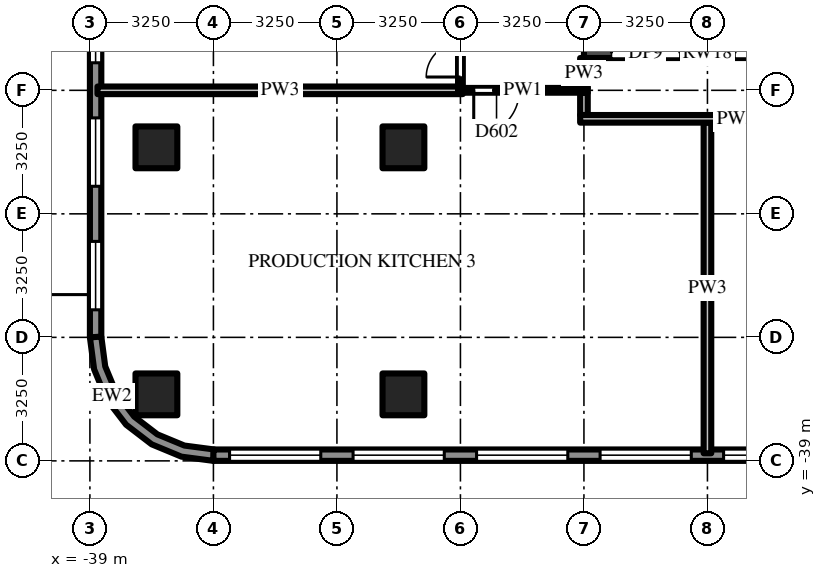
"""IFC4 building model, lengths in metres.
Left out: names, types, materials, properties, quantities, classifications, styles, units other than length and angle.
Written with IfcOpenShell. Run it as: python <this file> out.ifc"""

import sys

from ifc_helpers import new_model, si_unit, direction, frame, frame_2d, origin, origin_2d, place, context, subcontext, project, spatial, polyline, rectangle, outline, extrude, source, transform, mapped, element, fill, save


model = new_model("IFC4")
c1 = context("Model", 3, precision=1e-05, world=origin(), true_north=direction((0.0, 1.0)))
c2 = subcontext(c1, "Body", "Model", "MODEL_VIEW")
j1 = project(units=[si_unit("LENGTHUNIT", "METRE"), si_unit("PLANEANGLEUNIT", "RADIAN")], contexts=[c1])
p1 = place(None, origin())
s1 = spatial("IfcSite", under=j1, at=p1, CompositionType="ELEMENT")
p2 = place(p1, origin())
s2 = spatial("IfcBuilding", under=s1, at=p2, CompositionType="ELEMENT")
p3 = place(p2, frame((0.0, 0.0, 14.0)))
s3 = spatial("IfcBuildingStorey", under=s2, at=p3, CompositionType="ELEMENT", Elevation=14.0)
m1 = source(origin(), c2, "Body", "SweptSolid", [
    extrude(rectangle(XDim=1.1, YDim=1.1, at=origin_2d()), origin(), (0.0, 0.0, 1.0), 5.0),
])
for number, where, z_axis, x_axis in (
    (1, (-30.75, -30.75, 0.0), (0.0, 0.0, 1.0), (1.0, 0.0, 0.0)),
    (2, (-30.75, -37.25, 0.0), (0.0, 0.0, 1.0), (1.0, 0.0, 0.0)),
    (3, (-37.25, -30.75, 0.0), (0.0, 0.0, 1.0), (1.0, 0.0, 0.0)),
    (4, (-37.25, -37.25, 0.0), (0.0, 0.0, 1.0), (1.0, 0.0, 0.0)),
):
    element("IfcColumn", number, at=place(p3, frame(where, z_axis=z_axis, x_axis=x_axis)), inside=s3, PredefinedType="COLUMN", context=c2, shape_type="MappedRepresentation", body=[
        mapped(m1, transform((0.0, 0.0, 0.0))),
    ])
m2 = source(origin(), c2, "Body", "SweptSolid", [
    extrude(rectangle(XDim=6.5, YDim=0.25, at=frame_2d((3.25, 0.0))), origin(), (0.0, 0.0, 1.0), 4.7),
])
p4 = place(p3, frame((-26.0, -28.275, 0.0), z_axis=(0.0, 0.0, 1.0), x_axis=(1.0, 0.0, 0.0)))
e5 = element("IfcWall", 5, at=p4, inside=s3, PredefinedType="SHEAR", context=c2, shape_type="MappedRepresentation", body=[
    mapped(m2, transform((0.0, 0.0, 0.0))),
])
m3 = source(origin(), c2, "Body", "SweptSolid", [
    extrude(rectangle(XDim=1.8, YDim=2.1, at=frame_2d((0.9, 1.05))), frame((0.0, 0.135, 0.0), z_axis=(0.0, -1.0, 0.0), x_axis=(1.0, 0.0, 0.0)), (0.0, 0.0, 1.0), 0.27),
])
p5 = place(p4, frame((0.725, 0.0, 0.0)))
e6 = element("IfcOpeningElement", 6, at=p5, cuts=e5, PredefinedType="OPENING", context=c2, shape_type="MappedRepresentation", body=[
    mapped(m3, transform((0.0, 0.0, 0.0))),
])
p6 = place(p4, frame((3.975, 0.0, 0.0)))
e7 = element("IfcOpeningElement", 7, at=p6, cuts=e5, PredefinedType="OPENING", context=c2, shape_type="MappedRepresentation", body=[
    mapped(m3, transform((0.0, 0.0, 0.0))),
])
m4 = source(origin(), c2, "Body", "SweptSolid", [
    extrude(rectangle(XDim=71.5, YDim=0.3, at=frame_2d((35.75, 0.0))), origin(), (0.0, 0.0, 1.0), 4.7),
])
p7 = place(p3, frame((-38.85, 35.75, 0.0), z_axis=(0.0, 0.0, 1.0), x_axis=(0.0, -1.0, 0.0)))
e8 = element("IfcWall", 8, at=p7, inside=s3, PredefinedType="SOLIDWALL", context=c2, shape_type="MappedRepresentation", body=[
    mapped(m4, transform((0.0, 0.0, 0.0))),
])
m5 = source(origin(), c2, "Body", "SweptSolid", [
    extrude(rectangle(XDim=1.8, YDim=3.0, at=frame_2d((0.9, 1.5))), frame((0.0, 0.16, 0.0), z_axis=(0.0, -1.0, 0.0), x_axis=(1.0, 0.0, 0.0)), (0.0, 0.0, 1.0), 0.32),
])
p8 = place(p7, frame((0.725, 0.0, 0.9)))
e9 = element("IfcOpeningElement", 9, at=p8, cuts=e8, PredefinedType="OPENING", context=c2, shape_type="MappedRepresentation", body=[
    mapped(m5, transform((0.0, 0.0, 0.0))),
])
p9 = place(p7, frame((3.975, 0.0, 0.9)))
e10 = element("IfcOpeningElement", 10, at=p9, cuts=e8, PredefinedType="OPENING", context=c2, shape_type="MappedRepresentation", body=[
    mapped(m5, transform((0.0, 0.0, 0.0))),
])
p10 = place(p7, frame((7.225, 0.0, 0.9)))
e11 = element("IfcOpeningElement", 11, at=p10, cuts=e8, PredefinedType="OPENING", context=c2, shape_type="MappedRepresentation", body=[
    mapped(m5, transform((0.0, 0.0, 0.0))),
])
p11 = place(p7, frame((10.475, 0.0, 0.9)))
e12 = element("IfcOpeningElement", 12, at=p11, cuts=e8, PredefinedType="OPENING", context=c2, shape_type="MappedRepresentation", body=[
    mapped(m5, transform((0.0, 0.0, 0.0))),
])
p12 = place(p7, frame((13.725, 0.0, 0.9)))
e13 = element("IfcOpeningElement", 13, at=p12, cuts=e8, PredefinedType="OPENING", context=c2, shape_type="MappedRepresentation", body=[
    mapped(m5, transform((0.0, 0.0, 0.0))),
])
p13 = place(p7, frame((16.975, 0.0, 0.9)))
e14 = element("IfcOpeningElement", 14, at=p13, cuts=e8, PredefinedType="OPENING", context=c2, shape_type="MappedRepresentation", body=[
    mapped(m5, transform((0.0, 0.0, 0.0))),
])
p14 = place(p7, frame((20.225, 0.0, 0.9)))
e15 = element("IfcOpeningElement", 15, at=p14, cuts=e8, PredefinedType="OPENING", context=c2, shape_type="MappedRepresentation", body=[
    mapped(m5, transform((0.0, 0.0, 0.0))),
])
p15 = place(p7, frame((23.475, 0.0, 0.9)))
e16 = element("IfcOpeningElement", 16, at=p15, cuts=e8, PredefinedType="OPENING", context=c2, shape_type="MappedRepresentation", body=[
    mapped(m5, transform((0.0, 0.0, 0.0))),
])
p16 = place(p7, frame((26.725, 0.0, 0.9)))
e17 = element("IfcOpeningElement", 17, at=p16, cuts=e8, PredefinedType="OPENING", context=c2, shape_type="MappedRepresentation", body=[
    mapped(m5, transform((0.0, 0.0, 0.0))),
])
p17 = place(p7, frame((29.975, 0.0, 0.9)))
e18 = element("IfcOpeningElement", 18, at=p17, cuts=e8, PredefinedType="OPENING", context=c2, shape_type="MappedRepresentation", body=[
    mapped(m5, transform((0.0, 0.0, 0.0))),
])
p18 = place(p7, frame((33.225, 0.0, 0.9)))
e19 = element("IfcOpeningElement", 19, at=p18, cuts=e8, PredefinedType="OPENING", context=c2, shape_type="MappedRepresentation", body=[
    mapped(m5, transform((0.0, 0.0, 0.0))),
])
p19 = place(p7, frame((36.475, 0.0, 0.9)))
e20 = element("IfcOpeningElement", 20, at=p19, cuts=e8, PredefinedType="OPENING", context=c2, shape_type="MappedRepresentation", body=[
    mapped(m5, transform((0.0, 0.0, 0.0))),
])
p20 = place(p7, frame((39.725, 0.0, 0.9)))
e21 = element("IfcOpeningElement", 21, at=p20, cuts=e8, PredefinedType="OPENING", context=c2, shape_type="MappedRepresentation", body=[
    mapped(m5, transform((0.0, 0.0, 0.0))),
])
p21 = place(p7, frame((42.975, 0.0, 0.9)))
e22 = element("IfcOpeningElement", 22, at=p21, cuts=e8, PredefinedType="OPENING", context=c2, shape_type="MappedRepresentation", body=[
    mapped(m5, transform((0.0, 0.0, 0.0))),
])
p22 = place(p7, frame((46.225, 0.0, 0.9)))
e23 = element("IfcOpeningElement", 23, at=p22, cuts=e8, PredefinedType="OPENING", context=c2, shape_type="MappedRepresentation", body=[
    mapped(m5, transform((0.0, 0.0, 0.0))),
])
m6 = source(origin(), c2, "Body", "SweptSolid", [
    extrude(rectangle(XDim=1.8, YDim=2.4, at=frame_2d((0.9, 1.2))), frame((0.0, 0.16, 0.0), z_axis=(0.0, -1.0, 0.0), x_axis=(1.0, 0.0, 0.0)), (0.0, 0.0, 1.0), 0.32),
])
p23 = place(p7, frame((49.475, 0.0, 0.0)))
e24 = element("IfcOpeningElement", 24, at=p23, cuts=e8, PredefinedType="OPENING", context=c2, shape_type="MappedRepresentation", body=[
    mapped(m6, transform((0.0, 0.0, 0.0))),
])
p24 = place(p7, frame((52.725, 0.0, 0.9)))
e25 = element("IfcOpeningElement", 25, at=p24, cuts=e8, PredefinedType="OPENING", context=c2, shape_type="MappedRepresentation", body=[
    mapped(m5, transform((0.0, 0.0, 0.0))),
])
p25 = place(p7, frame((55.975, 0.0, 0.9)))
e26 = element("IfcOpeningElement", 26, at=p25, cuts=e8, PredefinedType="OPENING", context=c2, shape_type="MappedRepresentation", body=[
    mapped(m5, transform((0.0, 0.0, 0.0))),
])
p26 = place(p7, frame((59.225, 0.0, 0.9)))
e27 = element("IfcOpeningElement", 27, at=p26, cuts=e8, PredefinedType="OPENING", context=c2, shape_type="MappedRepresentation", body=[
    mapped(m5, transform((0.0, 0.0, 0.0))),
])
p27 = place(p7, frame((62.475, 0.0, 0.9)))
e28 = element("IfcOpeningElement", 28, at=p27, cuts=e8, PredefinedType="OPENING", context=c2, shape_type="MappedRepresentation", body=[
    mapped(m5, transform((0.0, 0.0, 0.0))),
])
p28 = place(p7, frame((65.725, 0.0, 0.9)))
e29 = element("IfcOpeningElement", 29, at=p28, cuts=e8, PredefinedType="OPENING", context=c2, shape_type="MappedRepresentation", body=[
    mapped(m5, transform((0.0, 0.0, 0.0))),
])
p29 = place(p7, frame((68.975, 0.0, 0.9)))
e30 = element("IfcOpeningElement", 30, at=p29, cuts=e8, PredefinedType="OPENING", context=c2, shape_type="MappedRepresentation", body=[
    mapped(m5, transform((0.0, 0.0, 0.0))),
])
m7 = source(origin(), c2, "Body", "SweptSolid", [
    extrude(outline(polyline([(-39.0, -35.75), (-38.889, -36.591), (-38.565, -37.375), (-38.048, -38.048), (-37.375, -38.565), (-36.591, -38.889), (-35.75, -39.0), (-35.73, -38.7), (-36.513, -38.597), (-37.224, -38.302), (-37.834, -37.834), (-38.302, -37.224), (-38.597, -36.513), (-38.7, -35.73), (-39.0, -35.75)])), origin(), (0.0, 0.0, 1.0), 4.7),
])
p30 = place(p3, origin())
e31 = element("IfcWall", 31, at=p30, inside=s3, PredefinedType="SOLIDWALL", context=c2, shape_type="MappedRepresentation", body=[
    mapped(m7, transform((0.0, 0.0, 0.0))),
])
p31 = place(p3, frame((-35.75, -38.85, 0.0), z_axis=(0.0, 0.0, 1.0), x_axis=(1.0, 0.0, 0.0)))
e32 = element("IfcWall", 32, at=p31, inside=s3, PredefinedType="SOLIDWALL", context=c2, shape_type="MappedRepresentation", body=[
    mapped(m4, transform((0.0, 0.0, 0.0))),
])
m8 = source(origin(), c2, "Body", "SweptSolid", [
    extrude(rectangle(XDim=2.4, YDim=3.0, at=frame_2d((1.2, 1.5))), frame((0.0, 0.16, 0.0), z_axis=(0.0, -1.0, 0.0), x_axis=(1.0, 0.0, 0.0)), (0.0, 0.0, 1.0), 0.32),
])
p32 = place(p31, frame((0.425, 0.0, 0.9)))
e33 = element("IfcOpeningElement", 33, at=p32, cuts=e32, PredefinedType="OPENING", context=c2, shape_type="MappedRepresentation", body=[
    mapped(m8, transform((0.0, 0.0, 0.0))),
])
p33 = place(p31, frame((3.675, 0.0, 0.9)))
e34 = element("IfcOpeningElement", 34, at=p33, cuts=e32, PredefinedType="OPENING", context=c2, shape_type="MappedRepresentation", body=[
    mapped(m8, transform((0.0, 0.0, 0.0))),
])
p34 = place(p31, frame((6.925, 0.0, 0.9)))
e35 = element("IfcOpeningElement", 35, at=p34, cuts=e32, PredefinedType="OPENING", context=c2, shape_type="MappedRepresentation", body=[
    mapped(m8, transform((0.0, 0.0, 0.0))),
])
p35 = place(p31, frame((10.175, 0.0, 0.9)))
e36 = element("IfcOpeningElement", 36, at=p35, cuts=e32, PredefinedType="OPENING", context=c2, shape_type="MappedRepresentation", body=[
    mapped(m8, transform((0.0, 0.0, 0.0))),
])
p36 = place(p31, frame((13.425, 0.0, 0.9)))
e37 = element("IfcOpeningElement", 37, at=p36, cuts=e32, PredefinedType="OPENING", context=c2, shape_type="MappedRepresentation", body=[
    mapped(m8, transform((0.0, 0.0, 0.0))),
])
p37 = place(p31, frame((16.675, 0.0, 0.9)))
e38 = element("IfcOpeningElement", 38, at=p37, cuts=e32, PredefinedType="OPENING", context=c2, shape_type="MappedRepresentation", body=[
    mapped(m8, transform((0.0, 0.0, 0.0))),
])
p38 = place(p31, frame((19.925, 0.0, 0.9)))
e39 = element("IfcOpeningElement", 39, at=p38, cuts=e32, PredefinedType="OPENING", context=c2, shape_type="MappedRepresentation", body=[
    mapped(m8, transform((0.0, 0.0, 0.0))),
])
p39 = place(p31, frame((23.175, 0.0, 0.9)))
e40 = element("IfcOpeningElement", 40, at=p39, cuts=e32, PredefinedType="OPENING", context=c2, shape_type="MappedRepresentation", body=[
    mapped(m8, transform((0.0, 0.0, 0.0))),
])
p40 = place(p31, frame((26.425, 0.0, 0.9)))
e41 = element("IfcOpeningElement", 41, at=p40, cuts=e32, PredefinedType="OPENING", context=c2, shape_type="MappedRepresentation", body=[
    mapped(m8, transform((0.0, 0.0, 0.0))),
])
p41 = place(p31, frame((29.675, 0.0, 0.9)))
e42 = element("IfcOpeningElement", 42, at=p41, cuts=e32, PredefinedType="OPENING", context=c2, shape_type="MappedRepresentation", body=[
    mapped(m8, transform((0.0, 0.0, 0.0))),
])
p42 = place(p31, frame((32.925, 0.0, 0.9)))
e43 = element("IfcOpeningElement", 43, at=p42, cuts=e32, PredefinedType="OPENING", context=c2, shape_type="MappedRepresentation", body=[
    mapped(m8, transform((0.0, 0.0, 0.0))),
])
p43 = place(p31, frame((36.175, 0.0, 0.9)))
e44 = element("IfcOpeningElement", 44, at=p43, cuts=e32, PredefinedType="OPENING", context=c2, shape_type="MappedRepresentation", body=[
    mapped(m8, transform((0.0, 0.0, 0.0))),
])
p44 = place(p31, frame((39.425, 0.0, 0.9)))
e45 = element("IfcOpeningElement", 45, at=p44, cuts=e32, PredefinedType="OPENING", context=c2, shape_type="MappedRepresentation", body=[
    mapped(m8, transform((0.0, 0.0, 0.0))),
])
p45 = place(p31, frame((42.675, 0.0, 0.9)))
e46 = element("IfcOpeningElement", 46, at=p45, cuts=e32, PredefinedType="OPENING", context=c2, shape_type="MappedRepresentation", body=[
    mapped(m8, transform((0.0, 0.0, 0.0))),
])
p46 = place(p31, frame((45.925, 0.0, 0.9)))
e47 = element("IfcOpeningElement", 47, at=p46, cuts=e32, PredefinedType="OPENING", context=c2, shape_type="MappedRepresentation", body=[
    mapped(m8, transform((0.0, 0.0, 0.0))),
])
p47 = place(p31, frame((49.175, 0.0, 0.9)))
e48 = element("IfcOpeningElement", 48, at=p47, cuts=e32, PredefinedType="OPENING", context=c2, shape_type="MappedRepresentation", body=[
    mapped(m8, transform((0.0, 0.0, 0.0))),
])
p48 = place(p31, frame((52.425, 0.0, 0.9)))
e49 = element("IfcOpeningElement", 49, at=p48, cuts=e32, PredefinedType="OPENING", context=c2, shape_type="MappedRepresentation", body=[
    mapped(m8, transform((0.0, 0.0, 0.0))),
])
p49 = place(p31, frame((55.675, 0.0, 0.9)))
e50 = element("IfcOpeningElement", 50, at=p49, cuts=e32, PredefinedType="OPENING", context=c2, shape_type="MappedRepresentation", body=[
    mapped(m8, transform((0.0, 0.0, 0.0))),
])
p50 = place(p31, frame((58.925, 0.0, 0.9)))
e51 = element("IfcOpeningElement", 51, at=p50, cuts=e32, PredefinedType="OPENING", context=c2, shape_type="MappedRepresentation", body=[
    mapped(m8, transform((0.0, 0.0, 0.0))),
])
p51 = place(p31, frame((62.175, 0.0, 0.9)))
e52 = element("IfcOpeningElement", 52, at=p51, cuts=e32, PredefinedType="OPENING", context=c2, shape_type="MappedRepresentation", body=[
    mapped(m8, transform((0.0, 0.0, 0.0))),
])
p52 = place(p31, frame((65.425, 0.0, 0.9)))
e53 = element("IfcOpeningElement", 53, at=p52, cuts=e32, PredefinedType="OPENING", context=c2, shape_type="MappedRepresentation", body=[
    mapped(m8, transform((0.0, 0.0, 0.0))),
])
p53 = place(p31, frame((68.675, 0.0, 0.9)))
e54 = element("IfcOpeningElement", 54, at=p53, cuts=e32, PredefinedType="OPENING", context=c2, shape_type="MappedRepresentation", body=[
    mapped(m8, transform((0.0, 0.0, 0.0))),
])
p54 = place(p3, frame((-29.25, -29.15, 0.0), z_axis=(0.0, 0.0, 1.0), x_axis=(0.0, 1.0, 0.0)))
e55 = element("IfcWall", 55, at=p54, inside=s3, PredefinedType="PARTITIONING", context=c2, shape_type="SweptSolid", body=[
    extrude(rectangle(XDim=25.8, YDim=0.125, at=frame_2d((12.9, 0.0))), origin(), (0.0, 0.0, 1.0), 3.762),
])
m9 = source(origin(), c2, "Body", "SweptSolid", [
    extrude(rectangle(XDim=1.8, YDim=2.1, at=frame_2d((0.9, 1.05))), frame((0.0, 0.073, 0.0), z_axis=(0.0, -1.0, 0.0), x_axis=(1.0, 0.0, 0.0)), (0.0, 0.0, 1.0), 0.145),
])
p55 = place(p54, frame((0.25, 0.0, 0.0)))
e56 = element("IfcOpeningElement", 56, at=p55, cuts=e55, PredefinedType="OPENING", context=c2, shape_type="MappedRepresentation", body=[
    mapped(m9, transform((0.0, 0.0, 0.0))),
])
m10 = source(origin(), c2, "Body", "SweptSolid", [
    extrude(rectangle(XDim=0.788, YDim=0.2, at=frame_2d((0.394, 0.0))), origin(), (0.0, 0.0, 1.0), 4.7),
])
p56 = place(p3, frame((-26.0, -29.188, 0.0), z_axis=(0.0, 0.0, 1.0), x_axis=(0.0, 1.0, 0.0)))
e57 = element("IfcWall", 57, at=p56, inside=s3, PredefinedType="PARTITIONING", context=c2, shape_type="MappedRepresentation", body=[
    mapped(m10, transform((0.0, 0.0, 0.0))),
])
m11 = source(origin(), c2, "Body", "SweptSolid", [
    extrude(rectangle(XDim=0.587, YDim=0.2, at=frame_2d((0.294, 0.0))), origin(), (0.0, 0.0, 1.0), 4.7),
])
p57 = place(p3, frame((-26.0, -29.9, 0.0), z_axis=(0.0, 0.0, 1.0), x_axis=(0.0, 1.0, 0.0)))
e58 = element("IfcWall", 58, at=p57, inside=s3, PredefinedType="PARTITIONING", context=c2, shape_type="MappedRepresentation", body=[
    mapped(m11, transform((0.0, 0.0, 0.0))),
])
m12 = source(origin(), c2, "Body", "SweptSolid", [
    extrude(rectangle(XDim=8.7, YDim=0.2, at=frame_2d((4.35, 0.0))), origin(), (0.0, 0.0, 1.0), 3.762),
])
p58 = place(p3, frame((-22.75, -38.8, 0.0), z_axis=(0.0, 0.0, 1.0), x_axis=(0.0, 1.0, 0.0)))
e59 = element("IfcWall", 59, at=p58, inside=s3, PredefinedType="PARTITIONING", context=c2, shape_type="MappedRepresentation", body=[
    mapped(m12, transform((0.0, 0.0, 0.0))),
])
m13 = source(origin(), c2, "Body", "SweptSolid", [
    extrude(rectangle(XDim=8.2, YDim=0.2, at=frame_2d((4.1, 0.0))), origin(), (0.0, 0.0, 1.0), 3.762),
])
p59 = place(p3, frame((-17.9, -30.0, 0.0), z_axis=(0.0, 0.0, 1.0), x_axis=(-1.0, 0.0, 0.0)))
e60 = element("IfcWall", 60, at=p59, inside=s3, PredefinedType="PARTITIONING", context=c2, shape_type="MappedRepresentation", body=[
    mapped(m13, transform((0.0, 0.0, 0.0))),
])
m14 = source(origin(), c2, "Body", "SweptSolid", [
    extrude(rectangle(XDim=9.613, YDim=0.2, at=frame_2d((4.806, 0.0))), origin(), (0.0, 0.0, 1.0), 3.762),
])
p60 = place(p3, frame((-38.8, -29.25, 0.0), z_axis=(0.0, 0.0, 1.0), x_axis=(1.0, 0.0, 0.0)))
e61 = element("IfcWall", 61, at=p60, inside=s3, PredefinedType="PARTITIONING", context=c2, shape_type="MappedRepresentation", body=[
    mapped(m14, transform((0.0, 0.0, 0.0))),
])
m15 = source(origin(), c2, "Body", "SweptSolid", [
    extrude(rectangle(XDim=3.413, YDim=0.125, at=frame_2d((1.706, 0.0))), origin(), (0.0, 0.0, 1.0), 4.7),
])
p61 = place(p3, frame((-25.9, -29.25, 0.0), z_axis=(0.0, 0.0, 1.0), x_axis=(-1.0, 0.0, 0.0)))
e62 = element("IfcWall", 62, at=p61, inside=s3, PredefinedType="PARTITIONING", context=c2, shape_type="MappedRepresentation", body=[
    mapped(m15, transform((0.0, 0.0, 0.0))),
])
m16 = source(origin(), c2, "Body", "SweptSolid", [
    extrude(rectangle(XDim=1.2, YDim=2.1, at=frame_2d((0.6, 1.05))), frame((0.0, 0.073, 0.0), z_axis=(0.0, -1.0, 0.0), x_axis=(1.0, 0.0, 0.0)), (0.0, 0.0, 1.0), 0.145),
])
p62 = place(p61, frame((1.8, 0.0, 0.0)))
e63 = element("IfcOpeningElement", 63, at=p62, cuts=e62, PredefinedType="OPENING", context=c2, shape_type="MappedRepresentation", body=[
    mapped(m16, transform((0.0, 0.0, 0.0))),
])
m17 = source(origin(), c2, "Body", "SweptSolid", [
    extrude(rectangle(XDim=1.8, YDim=2.1, at=frame_2d((0.9, 1.05))), frame((0.0, 0.025, 0.0), z_axis=(0.0, -1.0, 0.0), x_axis=(1.0, 0.0, 0.0)), (0.0, 0.0, 1.0), 0.05),
])
p63 = place(p5, origin())
e64 = element("IfcDoor", 64, at=p63, inside=s3, OperationType="DOUBLE_DOOR_SINGLE_SWING", PredefinedType="DOOR", context=c2, shape_type="MappedRepresentation", body=[
    mapped(m17, transform((0.0, 0.0, 0.0))),
])
fill(e6, e64)
p64 = place(p6, origin())
e65 = element("IfcDoor", 65, at=p64, inside=s3, OperationType="DOUBLE_DOOR_SINGLE_SWING", PredefinedType="DOOR", context=c2, shape_type="MappedRepresentation", body=[
    mapped(m17, transform((0.0, 0.0, 0.0))),
])
fill(e7, e65)
m18 = source(origin(), c2, "Body", "SweptSolid", [
    extrude(rectangle(XDim=1.8, YDim=3.0, at=frame_2d((0.9, 1.5))), frame((0.0, 0.03, 0.0), z_axis=(0.0, -1.0, 0.0), x_axis=(1.0, 0.0, 0.0)), (0.0, 0.0, 1.0), 0.06),
])
p65 = place(p27, origin())
e66 = element("IfcWindow", 66, at=p65, inside=s3, PartitioningType="SINGLE_PANEL", PredefinedType="WINDOW", context=c2, shape_type="MappedRepresentation", body=[
    mapped(m18, transform((0.0, 0.0, 0.0))),
])
fill(e28, e66)
p66 = place(p28, origin())
e67 = element("IfcWindow", 67, at=p66, inside=s3, PartitioningType="SINGLE_PANEL", PredefinedType="WINDOW", context=c2, shape_type="MappedRepresentation", body=[
    mapped(m18, transform((0.0, 0.0, 0.0))),
])
fill(e29, e67)
p67 = place(p29, origin())
e68 = element("IfcWindow", 68, at=p67, inside=s3, PartitioningType="SINGLE_PANEL", PredefinedType="WINDOW", context=c2, shape_type="MappedRepresentation", body=[
    mapped(m18, transform((0.0, 0.0, 0.0))),
])
fill(e30, e68)
m19 = source(origin(), c2, "Body", "SweptSolid", [
    extrude(rectangle(XDim=2.4, YDim=3.0, at=frame_2d((1.2, 1.5))), frame((0.0, 0.03, 0.0), z_axis=(0.0, -1.0, 0.0), x_axis=(1.0, 0.0, 0.0)), (0.0, 0.0, 1.0), 0.06),
])
p68 = place(p32, origin())
e69 = element("IfcWindow", 69, at=p68, inside=s3, PartitioningType="SINGLE_PANEL", PredefinedType="WINDOW", context=c2, shape_type="MappedRepresentation", body=[
    mapped(m19, transform((0.0, 0.0, 0.0))),
])
fill(e33, e69)
p69 = place(p33, origin())
e70 = element("IfcWindow", 70, at=p69, inside=s3, PartitioningType="SINGLE_PANEL", PredefinedType="WINDOW", context=c2, shape_type="MappedRepresentation", body=[
    mapped(m19, transform((0.0, 0.0, 0.0))),
])
fill(e34, e70)
p70 = place(p34, origin())
e71 = element("IfcWindow", 71, at=p70, inside=s3, PartitioningType="SINGLE_PANEL", PredefinedType="WINDOW", context=c2, shape_type="MappedRepresentation", body=[
    mapped(m19, transform((0.0, 0.0, 0.0))),
])
fill(e35, e71)
p71 = place(p35, origin())
e72 = element("IfcWindow", 72, at=p71, inside=s3, PartitioningType="SINGLE_PANEL", PredefinedType="WINDOW", context=c2, shape_type="MappedRepresentation", body=[
    mapped(m19, transform((0.0, 0.0, 0.0))),
])
fill(e36, e72)
p72 = place(p36, origin())
e73 = element("IfcWindow", 73, at=p72, inside=s3, PartitioningType="SINGLE_PANEL", PredefinedType="WINDOW", context=c2, shape_type="MappedRepresentation", body=[
    mapped(m19, transform((0.0, 0.0, 0.0))),
])
fill(e37, e73)
m20 = source(origin(), c2, "Body", "SweptSolid", [
    extrude(rectangle(XDim=1.2, YDim=2.1, at=frame_2d((0.6, 1.05))), frame((0.0, 0.025, 0.0), z_axis=(0.0, -1.0, 0.0), x_axis=(1.0, 0.0, 0.0)), (0.0, 0.0, 1.0), 0.05),
])
p73 = place(p62, origin())
e74 = element("IfcDoor", 74, at=p73, inside=s3, OperationType="SINGLE_SWING_RIGHT", PredefinedType="DOOR", context=c2, shape_type="MappedRepresentation", body=[
    mapped(m20, transform((0.0, 0.0, 0.0))),
])
fill(e63, e74)
p74 = place(p55, origin())
e75 = element("IfcDoor", 75, at=p74, inside=s3, OperationType="DOUBLE_DOOR_SINGLE_SWING", PredefinedType="DOOR", context=c2, shape_type="MappedRepresentation", body=[
    mapped(m17, transform((0.0, 0.0, 0.0))),
])
fill(e56, e75)
save(model, sys.argv[1])
